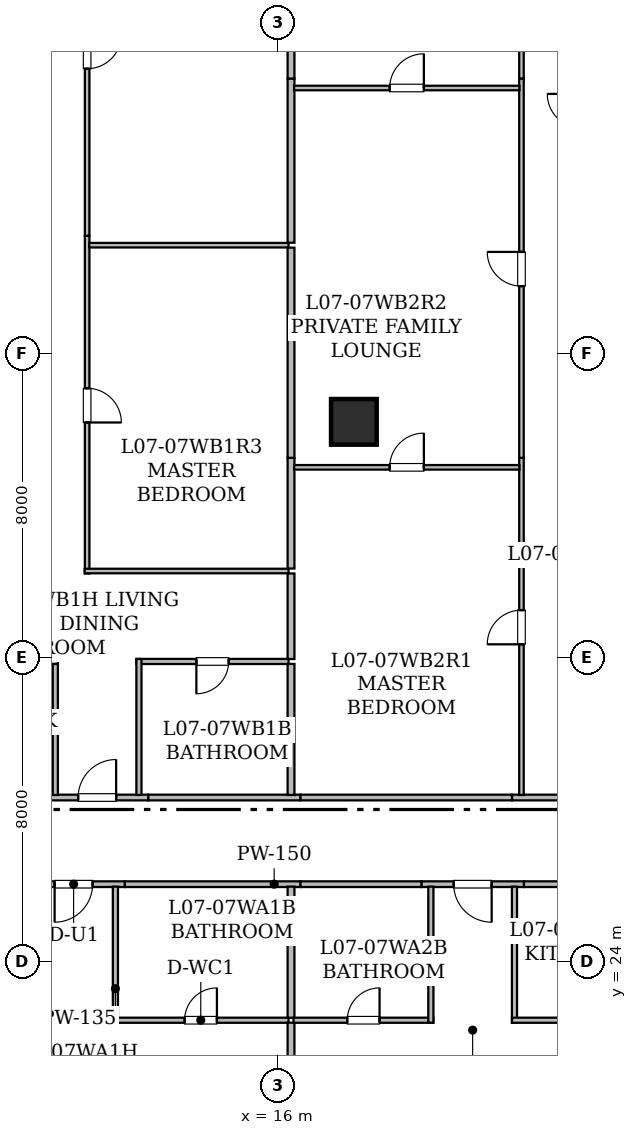
"""IFC4 building model, lengths in metres.
Left out: names, types, materials, properties, quantities, classifications, styles, units other than length and angle.
Written with IfcOpenShell. Run it as: python <this file> out.ifc"""

import sys

from ifc_helpers import new_model, si_unit, direction, frame, frame_2d, origin, origin_2d, place, context, subcontext, project, spatial, rectangle, hollow_rectangle, extrude, element, fill, save


model = new_model("IFC4")
c1 = context("Model", 3, precision=1e-05, world=origin(), true_north=direction((0.0, 1.0)))
c2 = subcontext(c1, "Body", "Model", "MODEL_VIEW")
j1 = project(units=[si_unit("LENGTHUNIT", "METRE"), si_unit("PLANEANGLEUNIT", "RADIAN")], contexts=[c1])
p1 = place(None, origin())
s1 = spatial("IfcSite", under=j1, at=p1, CompositionType="ELEMENT")
p2 = place(p1, origin())
s2 = spatial("IfcBuilding", under=s1, at=p2, CompositionType="ELEMENT")
p3 = place(p2, frame((0.0, 0.0, 33.3)))
s3 = spatial("IfcBuildingStorey", under=s2, at=p3, CompositionType="ELEMENT", Elevation=33.3)
p4 = place(p3, frame((18.0, 38.2, 0.025), z_axis=(0.0, 0.0, 1.0), x_axis=(1.0, 0.0, 0.0)))
e1 = element("IfcColumn", 1, at=p4, inside=s3, PredefinedType="COLUMN", context=c2, shape_type="SweptSolid", body=[
    extrude(hollow_rectangle(XDim=1.2, YDim=1.2, WallThickness=0.06, at=origin_2d()), origin(), (0.0, 0.0, 1.0), 3.625),
])
p5 = place(p3, frame((11.974, 26.035, 0.0), z_axis=(0.0, 0.0, 1.0), x_axis=(-1.0, 0.0, 0.0)))
e2 = element("IfcWall", 2, at=p5, inside=s3, PredefinedType="STANDARD", context=c2, shape_type="SweptSolid", body=[
    extrude(rectangle(XDim=2.698, YDim=0.15, at=frame_2d((1.349, 0.0))), origin(), (0.0, 0.0, 1.0), 3.43),
])
p6 = place(p5, frame((0.849, 0.0, 0.0)))
e3 = element("IfcOpeningElement", 3, at=p6, cuts=e2, PredefinedType="OPENING", context=c2, shape_type="SweptSolid", body=[
    extrude(rectangle(XDim=1.0, YDim=2.15, at=frame_2d((0.5, 1.075))), frame((0.0, 0.085, 0.0), z_axis=(0.0, -1.0, 0.0), x_axis=(1.0, 0.0, 0.0)), (0.0, 0.0, 1.0), 0.17),
])
p7 = place(p3, frame((16.596, 26.035, 0.0), z_axis=(0.0, 0.0, 1.0), x_axis=(-1.0, 0.0, 0.0)))
e4 = element("IfcWall", 4, at=p7, inside=s3, PredefinedType="STANDARD", context=c2, shape_type="SweptSolid", body=[
    extrude(rectangle(XDim=4.622, YDim=0.15, at=frame_2d((2.311, 0.0))), origin(), (0.0, 0.0, 1.0), 3.43),
])
p8 = place(p3, frame((22.476, 26.035, 0.0), z_axis=(0.0, 0.0, 1.0), x_axis=(-1.0, 0.0, 0.0)))
e5 = element("IfcWall", 5, at=p8, inside=s3, PredefinedType="STANDARD", context=c2, shape_type="SweptSolid", body=[
    extrude(rectangle(XDim=2.699, YDim=0.15, at=frame_2d((1.35, 0.0))), origin(), (0.0, 0.0, 1.0), 3.43),
])
p9 = place(p8, frame((0.85, 0.0, 0.0)))
e6 = element("IfcOpeningElement", 6, at=p9, cuts=e5, PredefinedType="OPENING", context=c2, shape_type="SweptSolid", body=[
    extrude(rectangle(XDim=1.0, YDim=2.15, at=frame_2d((0.5, 1.075))), frame((0.0, 0.085, 0.0), z_axis=(0.0, -1.0, 0.0), x_axis=(1.0, 0.0, 0.0)), (0.0, 0.0, 1.0), 0.17),
])
p10 = place(p3, frame((19.777, 26.035, 0.0), z_axis=(0.0, 0.0, 1.0), x_axis=(-1.0, 0.0, 0.0)))
e7 = element("IfcWall", 7, at=p10, inside=s3, PredefinedType="STANDARD", context=c2, shape_type="SweptSolid", body=[
    extrude(rectangle(XDim=3.181, YDim=0.15, at=frame_2d((1.591, 0.0))), origin(), (0.0, 0.0, 1.0), 2.647),
])
p11 = place(p3, frame((25.64, 26.035, 0.0), z_axis=(0.0, 0.0, 1.0), x_axis=(-1.0, 0.0, 0.0)))
e8 = element("IfcWall", 8, at=p11, inside=s3, PredefinedType="STANDARD", context=c2, shape_type="SweptSolid", body=[
    extrude(rectangle(XDim=3.164, YDim=0.15, at=frame_2d((1.582, 0.0))), origin(), (0.0, 0.0, 1.0), 3.43),
])
p12 = place(p3, frame((9.895, 28.315, 0.0), z_axis=(0.0, 0.0, 1.0), x_axis=(1.0, 0.0, 0.0)))
e9 = element("IfcWall", 9, at=p12, inside=s3, PredefinedType="STANDARD", context=c2, shape_type="SweptSolid", body=[
    extrude(rectangle(XDim=2.698, YDim=0.15, at=frame_2d((1.349, 0.0))), origin(), (0.0, 0.0, 1.0), 3.43),
])
p13 = place(p12, frame((0.849, 0.0, 0.0)))
e10 = element("IfcOpeningElement", 10, at=p13, cuts=e9, PredefinedType="OPENING", context=c2, shape_type="SweptSolid", body=[
    extrude(rectangle(XDim=1.0, YDim=2.15, at=frame_2d((0.5, 1.075))), frame((0.0, 0.085, 0.0), z_axis=(0.0, -1.0, 0.0), x_axis=(1.0, 0.0, 0.0)), (0.0, 0.0, 1.0), 0.17),
])
p14 = place(p3, frame((12.593, 28.315, 0.0), z_axis=(0.0, 0.0, 1.0), x_axis=(1.0, 0.0, 0.0)))
e11 = element("IfcWall", 11, at=p14, inside=s3, PredefinedType="STANDARD", context=c2, shape_type="SweptSolid", body=[
    extrude(rectangle(XDim=4.003, YDim=0.15, at=frame_2d((2.001, 0.0))), origin(), (0.0, 0.0, 1.0), 3.43),
])
p15 = place(p3, frame((22.161, 28.315, 0.0), z_axis=(0.0, 0.0, 1.0), x_axis=(1.0, 0.0, 0.0)))
e12 = element("IfcWall", 12, at=p15, inside=s3, PredefinedType="STANDARD", context=c2, shape_type="SweptSolid", body=[
    extrude(rectangle(XDim=2.079, YDim=0.15, at=frame_2d((1.04, 0.0))), origin(), (0.0, 0.0, 1.0), 3.43),
])
p16 = place(p3, frame((16.596, 28.315, 0.0), z_axis=(0.0, 0.0, 1.0), x_axis=(1.0, 0.0, 0.0)))
e13 = element("IfcWall", 13, at=p16, inside=s3, PredefinedType="STANDARD", context=c2, shape_type="SweptSolid", body=[
    extrude(rectangle(XDim=5.565, YDim=0.15, at=frame_2d((2.782, 0.0))), origin(), (0.0, 0.0, 1.0), 2.647),
])
p17 = place(p3, frame((11.725, 25.97, 0.0), z_axis=(0.0, 0.0, 1.0), x_axis=(0.0, -1.0, 0.0)))
e14 = element("IfcWall", 14, at=p17, inside=s3, PredefinedType="PARTITIONING", context=c2, shape_type="SweptSolid", body=[
    extrude(rectangle(XDim=3.58, YDim=0.135, at=frame_2d((1.79, 0.0))), origin(), (0.0, 0.0, 1.0), 2.957),
])
p18 = place(p3, frame((11.66, 22.455, 0.0), z_axis=(0.0, 0.0, 1.0), x_axis=(1.0, 0.0, 0.0)))
e15 = element("IfcWall", 15, at=p18, inside=s3, PredefinedType="PARTITIONING", context=c2, shape_type="SweptSolid", body=[
    extrude(rectangle(XDim=4.621, YDim=0.135, at=frame_2d((2.311, 0.0))), origin(), (0.0, 0.0, 1.0), 3.43),
])
p19 = place(p18, frame((1.886, 0.0, 0.0)))
e16 = element("IfcOpeningElement", 16, at=p19, cuts=e15, PredefinedType="OPENING", context=c2, shape_type="SweptSolid", body=[
    extrude(rectangle(XDim=0.85, YDim=2.1, at=frame_2d((0.425, 1.05))), frame((0.0, 0.077, 0.0), z_axis=(0.0, -1.0, 0.0), x_axis=(1.0, 0.0, 0.0)), (0.0, 0.0, 1.0), 0.155),
])
p20 = place(p3, frame((16.346, 22.39, 0.0), z_axis=(0.0, 0.0, 1.0), x_axis=(0.0, -1.0, 0.0)))
e17 = element("IfcWall", 17, at=p20, inside=s3, PredefinedType="STANDARD", context=c2, shape_type="SweptSolid", body=[
    extrude(rectangle(XDim=1.45, YDim=0.18, at=frame_2d((0.725, 0.0))), origin(), (0.0, 0.0, 1.0), 3.43),
])
p21 = place(p3, frame((16.346, 25.97, 0.0), z_axis=(0.0, 0.0, 1.0), x_axis=(0.0, -1.0, 0.0)))
e18 = element("IfcWall", 18, at=p21, inside=s3, PredefinedType="STANDARD", context=c2, shape_type="SweptSolid", body=[
    extrude(rectangle(XDim=3.45, YDim=0.18, at=frame_2d((1.725, 0.0))), origin(), (0.0, 0.0, 1.0), 2.957),
])
p22 = place(p3, frame((16.411, 22.455, 0.0), z_axis=(0.0, 0.0, 1.0), x_axis=(1.0, 0.0, 0.0)))
e19 = element("IfcWall", 19, at=p22, inside=s3, PredefinedType="PARTITIONING", context=c2, shape_type="SweptSolid", body=[
    extrude(rectangle(XDim=3.68, YDim=0.135, at=frame_2d((1.84, 0.0))), origin(), (0.0, 0.0, 1.0), 2.647),
])
p23 = place(p22, frame((1.415, 0.0, 0.0)))
e20 = element("IfcOpeningElement", 20, at=p23, cuts=e19, PredefinedType="OPENING", context=c2, shape_type="SweptSolid", body=[
    extrude(rectangle(XDim=0.85, YDim=2.1, at=frame_2d((0.425, 1.05))), frame((0.0, 0.077, 0.0), z_axis=(0.0, -1.0, 0.0), x_axis=(1.0, 0.0, 0.0)), (0.0, 0.0, 1.0), 0.155),
])
for number, where, z_axis, x_axis in (
    (21, (20.026, 22.39, 0.0), (0.0, 0.0, 1.0), (0.0, 1.0, 0.0)),
    (22, (22.226, 25.97, 0.0), (0.0, 0.0, 1.0), (0.0, -1.0, 0.0)),
):
    element("IfcWall", number, at=place(p3, frame(where, z_axis=z_axis, x_axis=x_axis)), inside=s3, PredefinedType="PARTITIONING", context=c2, shape_type="SweptSolid", body=[
        extrude(rectangle(XDim=3.58, YDim=0.135, at=frame_2d((1.79, 0.0))), origin(), (0.0, 0.0, 1.0), 3.43),
    ])
p24 = place(p3, frame((22.161, 22.455, 0.0), z_axis=(0.0, 0.0, 1.0), x_axis=(1.0, 0.0, 0.0)))
e23 = element("IfcWall", 23, at=p24, inside=s3, PredefinedType="PARTITIONING", context=c2, shape_type="SweptSolid", body=[
    extrude(rectangle(XDim=4.609, YDim=0.135, at=frame_2d((2.305, 0.0))), origin(), (0.0, 0.0, 1.0), 3.43),
])
p25 = place(p24, frame((1.879, 0.0, 0.0)))
e24 = element("IfcOpeningElement", 24, at=p25, cuts=e23, PredefinedType="OPENING", context=c2, shape_type="SweptSolid", body=[
    extrude(rectangle(XDim=0.85, YDim=2.1, at=frame_2d((0.425, 1.05))), frame((0.0, 0.077, 0.0), z_axis=(0.0, -1.0, 0.0), x_axis=(1.0, 0.0, 0.0)), (0.0, 0.0, 1.0), 0.155),
])
p26 = place(p3, frame((16.281, 31.895, 0.0), z_axis=(0.0, 0.0, 1.0), x_axis=(-1.0, 0.0, 0.0)))
e25 = element("IfcWall", 25, at=p26, inside=s3, PredefinedType="PARTITIONING", context=c2, shape_type="SweptSolid", body=[
    extrude(rectangle(XDim=4.002, YDim=0.135, at=frame_2d((2.001, 0.0))), origin(), (0.0, 0.0, 1.0), 3.43),
])
p27 = place(p26, frame((1.576, 0.0, 0.0)))
e26 = element("IfcOpeningElement", 26, at=p27, cuts=e25, PredefinedType="OPENING", context=c2, shape_type="SweptSolid", body=[
    extrude(rectangle(XDim=0.85, YDim=2.1, at=frame_2d((0.425, 1.05))), frame((0.0, 0.077, 0.0), z_axis=(0.0, -1.0, 0.0), x_axis=(1.0, 0.0, 0.0)), (0.0, 0.0, 1.0), 0.155),
])
for number, where, z_axis, x_axis in (
    (27, (12.344, 31.96, 0.0), (0.0, 0.0, 1.0), (0.0, -1.0, 0.0)),
    (28, (10.144, 28.382, 0.0), (0.0, 0.0, 1.0), (0.0, 1.0, 0.0)),
):
    element("IfcWall", number, at=place(p3, frame(where, z_axis=z_axis, x_axis=x_axis)), inside=s3, PredefinedType="PARTITIONING", context=c2, shape_type="SweptSolid", body=[
        extrude(rectangle(XDim=3.578, YDim=0.135, at=frame_2d((1.789, 0.0))), origin(), (0.0, 0.0, 1.0), 3.43),
    ])
p28 = place(p3, frame((10.209, 31.895, 0.0), z_axis=(0.0, 0.0, 1.0), x_axis=(-1.0, 0.0, 0.0)))
e29 = element("IfcWall", 29, at=p28, inside=s3, PredefinedType="PARTITIONING", context=c2, shape_type="SweptSolid", body=[
    extrude(rectangle(XDim=5.997, YDim=0.135, at=frame_2d((2.999, 0.0))), origin(), (0.0, 0.0, 1.0), 2.803),
])
p29 = place(p28, frame((2.574, 0.0, 0.0)))
e30 = element("IfcOpeningElement", 30, at=p29, cuts=e29, PredefinedType="OPENING", context=c2, shape_type="SweptSolid", body=[
    extrude(rectangle(XDim=0.85, YDim=2.1, at=frame_2d((0.425, 1.05))), frame((0.0, 0.077, 0.0), z_axis=(0.0, -1.0, 0.0), x_axis=(1.0, 0.0, 0.0)), (0.0, 0.0, 1.0), 0.155),
])
p30 = place(p3, frame((10.981, 43.097, 0.0), z_axis=(0.0, 0.0, 1.0), x_axis=(0.0, -1.0, 0.0)))
e31 = element("IfcWall", 31, at=p30, inside=s3, PredefinedType="PARTITIONING", context=c2, shape_type="SweptSolid", body=[
    extrude(rectangle(XDim=8.887, YDim=0.12, at=frame_2d((4.443, 0.0))), origin(), (0.0, 0.0, 1.0), 2.647),
])
p31 = place(p30, frame((4.014, 0.0, 0.0)))
e32 = element("IfcOpeningElement", 32, at=p31, cuts=e31, PredefinedType="OPENING", context=c2, shape_type="SweptSolid", body=[
    extrude(rectangle(XDim=0.9, YDim=2.1, at=frame_2d((0.45, 1.05))), frame((0.0, 0.07, 0.0), z_axis=(0.0, -1.0, 0.0), x_axis=(1.0, 0.0, 0.0)), (0.0, 0.0, 1.0), 0.14),
])
p32 = place(p3, frame((10.916, 34.275, 0.0), z_axis=(0.0, 0.0, 1.0), x_axis=(1.0, 0.0, 0.0)))
e33 = element("IfcWall", 33, at=p32, inside=s3, PredefinedType="PARTITIONING", context=c2, shape_type="SweptSolid", body=[
    extrude(rectangle(XDim=5.365, YDim=0.12, at=frame_2d((2.683, 0.0))), origin(), (0.0, 0.0, 1.0), 3.43),
])
p33 = place(p3, frame((10.981, 52.788, 0.0), z_axis=(0.0, 0.0, 1.0), x_axis=(0.0, -1.0, 0.0)))
e34 = element("IfcWall", 34, at=p33, inside=s3, PredefinedType="PARTITIONING", context=c2, shape_type="SweptSolid", body=[
    extrude(rectangle(XDim=9.691, YDim=0.12, at=frame_2d((4.846, 0.0))), origin(), (0.0, 0.0, 1.0), 2.647),
])
p34 = place(p33, frame((4.396, 0.0, 0.0)))
e35 = element("IfcOpeningElement", 35, at=p34, cuts=e34, PredefinedType="OPENING", context=c2, shape_type="SweptSolid", body=[
    extrude(rectangle(XDim=0.9, YDim=2.1, at=frame_2d((0.45, 1.05))), frame((0.0, 0.07, 0.0), z_axis=(0.0, -1.0, 0.0), x_axis=(1.0, 0.0, 0.0)), (0.0, 0.0, 1.0), 0.14),
])
p35 = place(p3, frame((16.346, 34.21, 0.0), z_axis=(0.0, 0.0, 1.0), x_axis=(0.0, -1.0, 0.0)))
e36 = element("IfcWall", 36, at=p35, inside=s3, PredefinedType="STANDARD", context=c2, shape_type="SweptSolid", body=[
    extrude(rectangle(XDim=2.25, YDim=0.18, at=frame_2d((1.125, 0.0))), origin(), (0.0, 0.0, 1.0), 3.43),
])
p36 = place(p3, frame((16.346, 31.83, 0.0), z_axis=(0.0, 0.0, 1.0), x_axis=(0.0, -1.0, 0.0)))
e37 = element("IfcWall", 37, at=p36, inside=s3, PredefinedType="STANDARD", context=c2, shape_type="SweptSolid", body=[
    extrude(rectangle(XDim=3.448, YDim=0.18, at=frame_2d((1.724, 0.0))), origin(), (0.0, 0.0, 1.0), 3.43),
])
p37 = place(p3, frame((11.035, 42.848, 0.0), z_axis=(0.0, 0.0, 1.0), x_axis=(1.0, 0.0, 0.0)))
e38 = element("IfcWall", 38, at=p37, inside=s3, PredefinedType="PARTITIONING", context=c2, shape_type="SweptSolid", body=[
    extrude(rectangle(XDim=5.246, YDim=0.12, at=frame_2d((2.623, 0.0))), origin(), (0.0, 0.0, 1.0), 2.647),
])
p38 = place(p3, frame((16.346, 37.252, 0.0), z_axis=(0.0, 0.0, 1.0), x_axis=(0.0, -1.0, 0.0)))
e39 = element("IfcWall", 39, at=p38, inside=s3, PredefinedType="STANDARD", context=c2, shape_type="SweptSolid", body=[
    extrude(rectangle(XDim=2.912, YDim=0.18, at=frame_2d((1.456, 0.0))), origin(), (0.0, 0.0, 1.0), 3.43),
])
p39 = place(p3, frame((16.346, 42.783, 0.0), z_axis=(0.0, 0.0, 1.0), x_axis=(0.0, -1.0, 0.0)))
e40 = element("IfcWall", 40, at=p39, inside=s3, PredefinedType="STANDARD", context=c2, shape_type="SweptSolid", body=[
    extrude(rectangle(XDim=5.531, YDim=0.18, at=frame_2d((2.766, 0.0))), origin(), (0.0, 0.0, 1.0), 2.647),
])
p40 = place(p3, frame((16.346, 47.233, 0.0), z_axis=(0.0, 0.0, 1.0), x_axis=(0.0, -1.0, 0.0)))
e41 = element("IfcWall", 41, at=p40, inside=s3, PredefinedType="STANDARD", context=c2, shape_type="SweptSolid", body=[
    extrude(rectangle(XDim=4.32, YDim=0.18, at=frame_2d((2.16, 0.0))), origin(), (0.0, 0.0, 1.0), 3.43),
])
p41 = place(p3, frame((16.346, 52.788, 0.0), z_axis=(0.0, 0.0, 1.0), x_axis=(0.0, -1.0, 0.0)))
e42 = element("IfcWall", 42, at=p41, inside=s3, PredefinedType="STANDARD", context=c2, shape_type="SweptSolid", body=[
    extrude(rectangle(XDim=5.555, YDim=0.18, at=frame_2d((2.778, 0.0))), origin(), (0.0, 0.0, 1.0), 2.803),
])
p42 = place(p3, frame((22.41, 28.382, 0.0), z_axis=(0.0, 0.0, 1.0), x_axis=(0.0, 1.0, 0.0)))
e43 = element("IfcWall", 43, at=p42, inside=s3, PredefinedType="PARTITIONING", context=c2, shape_type="SweptSolid", body=[
    extrude(rectangle(XDim=8.87, YDim=0.12, at=frame_2d((4.435, 0.0))), origin(), (0.0, 0.0, 1.0), 3.43),
])
p43 = place(p42, frame((3.964, 0.0, 0.0)))
e44 = element("IfcOpeningElement", 44, at=p43, cuts=e43, PredefinedType="OPENING", context=c2, shape_type="SweptSolid", body=[
    extrude(rectangle(XDim=0.9, YDim=2.1, at=frame_2d((0.45, 1.05))), frame((0.0, 0.07, 0.0), z_axis=(0.0, -1.0, 0.0), x_axis=(1.0, 0.0, 0.0)), (0.0, 0.0, 1.0), 0.14),
])
p44 = place(p3, frame((22.41, 37.252, 0.0), z_axis=(0.0, 0.0, 1.0), x_axis=(0.0, 1.0, 0.0)))
e45 = element("IfcWall", 45, at=p44, inside=s3, PredefinedType="PARTITIONING", context=c2, shape_type="SweptSolid", body=[
    extrude(rectangle(XDim=9.981, YDim=0.12, at=frame_2d((4.99, 0.0))), origin(), (0.0, 0.0, 1.0), 2.647),
])
p45 = place(p44, frame((4.519, 0.0, 0.0)))
e46 = element("IfcOpeningElement", 46, at=p45, cuts=e45, PredefinedType="OPENING", context=c2, shape_type="SweptSolid", body=[
    extrude(rectangle(XDim=0.9, YDim=2.1, at=frame_2d((0.45, 1.05))), frame((0.0, 0.07, 0.0), z_axis=(0.0, -1.0, 0.0), x_axis=(1.0, 0.0, 0.0)), (0.0, 0.0, 1.0), 0.14),
])
p46 = place(p3, frame((22.41, 47.233, 0.0), z_axis=(0.0, 0.0, 1.0), x_axis=(0.0, 1.0, 0.0)))
e47 = element("IfcWall", 47, at=p46, inside=s3, PredefinedType="PARTITIONING", context=c2, shape_type="SweptSolid", body=[
    extrude(rectangle(XDim=5.555, YDim=0.12, at=frame_2d((2.778, 0.0))), origin(), (0.0, 0.0, 1.0), 2.803),
])
p47 = place(p46, frame((1.98, 0.0, 0.0)))
e48 = element("IfcOpeningElement", 48, at=p47, cuts=e47, PredefinedType="OPENING", context=c2, shape_type="SweptSolid", body=[
    extrude(rectangle(XDim=0.9, YDim=2.1, at=frame_2d((0.45, 1.05))), frame((0.0, 0.07, 0.0), z_axis=(0.0, -1.0, 0.0), x_axis=(1.0, 0.0, 0.0)), (0.0, 0.0, 1.0), 0.14),
])
p48 = place(p3, frame((16.428, 37.003, 0.0), z_axis=(0.0, 0.0, 1.0), x_axis=(1.0, 0.0, 0.0)))
e49 = element("IfcWall", 49, at=p48, inside=s3, PredefinedType="PARTITIONING", context=c2, shape_type="SweptSolid", body=[
    extrude(rectangle(XDim=5.928, YDim=0.12, at=frame_2d((2.964, 0.0))), origin(), (0.0, 0.0, 1.0), 2.647),
])
p49 = place(p48, frame((2.514, 0.0, 0.0)))
e50 = element("IfcOpeningElement", 50, at=p49, cuts=e49, PredefinedType="OPENING", context=c2, shape_type="SweptSolid", body=[
    extrude(rectangle(XDim=0.9, YDim=2.1, at=frame_2d((0.45, 1.05))), frame((0.0, 0.07, 0.0), z_axis=(0.0, -1.0, 0.0), x_axis=(1.0, 0.0, 0.0)), (0.0, 0.0, 1.0), 0.14),
])
p50 = place(p3, frame((16.428, 46.984, 0.0), z_axis=(0.0, 0.0, 1.0), x_axis=(1.0, 0.0, 0.0)))
e51 = element("IfcWall", 51, at=p50, inside=s3, PredefinedType="PARTITIONING", context=c2, shape_type="SweptSolid", body=[
    extrude(rectangle(XDim=5.928, YDim=0.12, at=frame_2d((2.964, 0.0))), origin(), (0.0, 0.0, 1.0), 2.647),
])
p51 = place(p50, frame((2.514, 0.0, 0.0)))
e52 = element("IfcOpeningElement", 52, at=p51, cuts=e51, PredefinedType="OPENING", context=c2, shape_type="SweptSolid", body=[
    extrude(rectangle(XDim=0.9, YDim=2.1, at=frame_2d((0.45, 1.05))), frame((0.0, 0.07, 0.0), z_axis=(0.0, -1.0, 0.0), x_axis=(1.0, 0.0, 0.0)), (0.0, 0.0, 1.0), 0.14),
])
p52 = place(p6, origin())
e53 = element("IfcDoor", 53, at=p52, inside=s3, OperationType="SINGLE_SWING_RIGHT", PredefinedType="DOOR", context=c2, shape_type="SweptSolid", body=[
    extrude(rectangle(XDim=1.0, YDim=2.15, at=frame_2d((0.5, 1.075))), frame((0.0, 0.025, 0.0), z_axis=(0.0, -1.0, 0.0), x_axis=(1.0, 0.0, 0.0)), (0.0, 0.0, 1.0), 0.05),
])
fill(e3, e53)
p53 = place(p9, origin())
e54 = element("IfcDoor", 54, at=p53, inside=s3, OperationType="SINGLE_SWING_LEFT", PredefinedType="DOOR", context=c2, shape_type="SweptSolid", body=[
    extrude(rectangle(XDim=1.0, YDim=2.15, at=frame_2d((0.5, 1.075))), frame((0.0, 0.025, 0.0), z_axis=(0.0, -1.0, 0.0), x_axis=(1.0, 0.0, 0.0)), (0.0, 0.0, 1.0), 0.05),
])
fill(e6, e54)
p54 = place(p13, origin())
e55 = element("IfcDoor", 55, at=p54, inside=s3, OperationType="SINGLE_SWING_RIGHT", PredefinedType="DOOR", context=c2, shape_type="SweptSolid", body=[
    extrude(rectangle(XDim=1.0, YDim=2.15, at=frame_2d((0.5, 1.075))), frame((0.0, 0.025, 0.0), z_axis=(0.0, -1.0, 0.0), x_axis=(1.0, 0.0, 0.0)), (0.0, 0.0, 1.0), 0.05),
])
fill(e10, e55)
p55 = place(p19, origin())
e56 = element("IfcDoor", 56, at=p55, inside=s3, OperationType="SINGLE_SWING_RIGHT", PredefinedType="DOOR", context=c2, shape_type="SweptSolid", body=[
    extrude(rectangle(XDim=0.85, YDim=2.1, at=frame_2d((0.425, 1.05))), frame((0.0, 0.025, 0.0), z_axis=(0.0, -1.0, 0.0), x_axis=(1.0, 0.0, 0.0)), (0.0, 0.0, 1.0), 0.05),
])
fill(e16, e56)
p56 = place(p23, origin())
e57 = element("IfcDoor", 57, at=p56, inside=s3, OperationType="SINGLE_SWING_RIGHT", PredefinedType="DOOR", context=c2, shape_type="SweptSolid", body=[
    extrude(rectangle(XDim=0.85, YDim=2.1, at=frame_2d((0.425, 1.05))), frame((0.0, 0.025, 0.0), z_axis=(0.0, -1.0, 0.0), x_axis=(1.0, 0.0, 0.0)), (0.0, 0.0, 1.0), 0.05),
])
fill(e20, e57)
p57 = place(p27, origin())
e58 = element("IfcDoor", 58, at=p57, inside=s3, OperationType="SINGLE_SWING_RIGHT", PredefinedType="DOOR", context=c2, shape_type="SweptSolid", body=[
    extrude(rectangle(XDim=0.85, YDim=2.1, at=frame_2d((0.425, 1.05))), frame((0.0, 0.025, 0.0), z_axis=(0.0, -1.0, 0.0), x_axis=(1.0, 0.0, 0.0)), (0.0, 0.0, 1.0), 0.05),
])
fill(e26, e58)
p58 = place(p31, origin())
e59 = element("IfcDoor", 59, at=p58, inside=s3, OperationType="SINGLE_SWING_RIGHT", PredefinedType="DOOR", context=c2, shape_type="SweptSolid", body=[
    extrude(rectangle(XDim=0.9, YDim=2.1, at=frame_2d((0.45, 1.05))), frame((0.0, 0.025, 0.0), z_axis=(0.0, -1.0, 0.0), x_axis=(1.0, 0.0, 0.0)), (0.0, 0.0, 1.0), 0.05),
])
fill(e32, e59)
p59 = place(p34, origin())
e60 = element("IfcDoor", 60, at=p59, inside=s3, OperationType="SINGLE_SWING_LEFT", PredefinedType="DOOR", context=c2, shape_type="SweptSolid", body=[
    extrude(rectangle(XDim=0.9, YDim=2.1, at=frame_2d((0.45, 1.05))), frame((0.0, 0.025, 0.0), z_axis=(0.0, -1.0, 0.0), x_axis=(1.0, 0.0, 0.0)), (0.0, 0.0, 1.0), 0.05),
])
fill(e35, e60)
p60 = place(p43, origin())
e61 = element("IfcDoor", 61, at=p60, inside=s3, OperationType="SINGLE_SWING_LEFT", PredefinedType="DOOR", context=c2, shape_type="SweptSolid", body=[
    extrude(rectangle(XDim=0.9, YDim=2.1, at=frame_2d((0.45, 1.05))), frame((0.0, 0.025, 0.0), z_axis=(0.0, -1.0, 0.0), x_axis=(1.0, 0.0, 0.0)), (0.0, 0.0, 1.0), 0.05),
])
fill(e44, e61)
p61 = place(p45, origin())
e62 = element("IfcDoor", 62, at=p61, inside=s3, OperationType="SINGLE_SWING_RIGHT", PredefinedType="DOOR", context=c2, shape_type="SweptSolid", body=[
    extrude(rectangle(XDim=0.9, YDim=2.1, at=frame_2d((0.45, 1.05))), frame((0.0, 0.025, 0.0), z_axis=(0.0, -1.0, 0.0), x_axis=(1.0, 0.0, 0.0)), (0.0, 0.0, 1.0), 0.05),
])
fill(e46, e62)
p62 = place(p49, origin())
e63 = element("IfcDoor", 63, at=p62, inside=s3, OperationType="SINGLE_SWING_RIGHT", PredefinedType="DOOR", context=c2, shape_type="SweptSolid", body=[
    extrude(rectangle(XDim=0.9, YDim=2.1, at=frame_2d((0.45, 1.05))), frame((0.0, 0.025, 0.0), z_axis=(0.0, -1.0, 0.0), x_axis=(1.0, 0.0, 0.0)), (0.0, 0.0, 1.0), 0.05),
])
fill(e50, e63)
p63 = place(p51, origin())
e64 = element("IfcDoor", 64, at=p63, inside=s3, OperationType="SINGLE_SWING_RIGHT", PredefinedType="DOOR", context=c2, shape_type="SweptSolid", body=[
    extrude(rectangle(XDim=0.9, YDim=2.1, at=frame_2d((0.45, 1.05))), frame((0.0, 0.025, 0.0), z_axis=(0.0, -1.0, 0.0), x_axis=(1.0, 0.0, 0.0)), (0.0, 0.0, 1.0), 0.05),
])
fill(e52, e64)
save(model, sys.argv[1])
